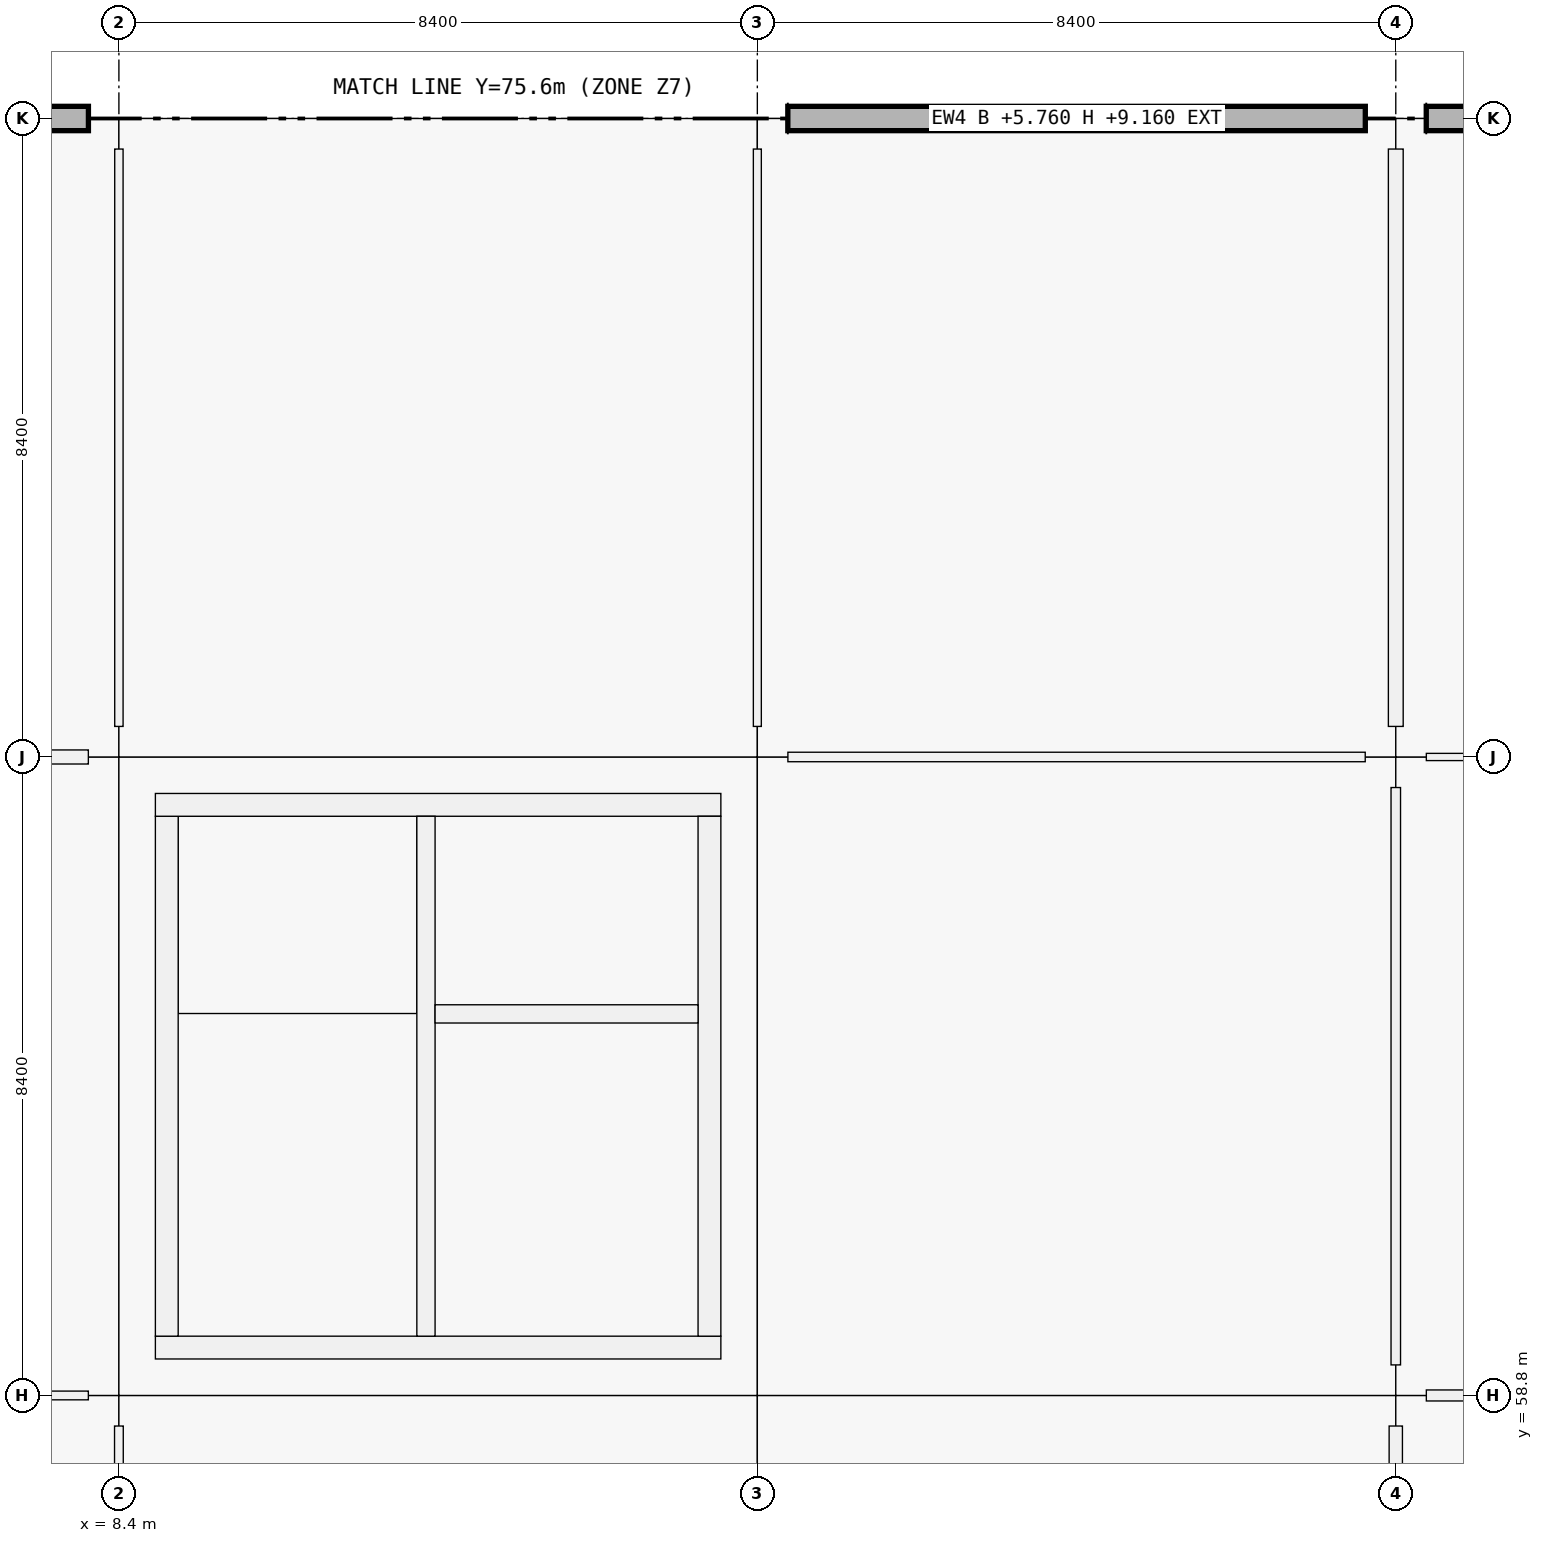
"""IFC4 building model, lengths in metres.
Left out: names, types, materials, properties, quantities, classifications, styles, units other than length and angle.
Written with IfcOpenShell. Run it as: python <this file> out.ifc"""

import sys

from ifc_helpers import new_model, si_unit, direction, frame, frame_2d, origin, origin_2d, place, context, subcontext, project, spatial, rectangle, extrude, element, fill, save


model = new_model("IFC4")
c1 = context("Model", 3, precision=1e-05, world=origin(), true_north=direction((0.0, 1.0)))
c2 = subcontext(c1, "Body", "Model", "MODEL_VIEW")
j1 = project(units=[si_unit("LENGTHUNIT", "METRE"), si_unit("PLANEANGLEUNIT", "RADIAN")], contexts=[c1])
p1 = place(None, origin())
s1 = spatial("IfcSite", under=j1, at=p1, CompositionType="ELEMENT")
p2 = place(p1, origin())
s2 = spatial("IfcBuilding", under=s1, at=p2, CompositionType="ELEMENT")
p3 = place(p2, frame((0.0, 0.0, 5.76)))
s3 = spatial("IfcBuildingStorey", under=s2, at=p3, CompositionType="ELEMENT", Elevation=5.76)
for number, where, z_axis, x_axis in (
    (1, (8.4, 58.8, 0.0), (0.0, 0.0, 1.0), (1.0, 0.0, 0.0)),
    (2, (8.4, 67.2, 0.0), (0.0, 0.0, 1.0), (1.0, 0.0, 0.0)),
    (3, (8.4, 75.6, 0.0), (0.0, 0.0, 1.0), (1.0, 0.0, 0.0)),
    (4, (16.8, 58.8, 0.0), (0.0, 0.0, 1.0), (1.0, 0.0, 0.0)),
    (5, (16.8, 67.2, 0.0), (0.0, 0.0, 1.0), (1.0, 0.0, 0.0)),
    (6, (16.8, 75.6, 0.0), (0.0, 0.0, 1.0), (1.0, 0.0, 0.0)),
    (7, (25.2, 58.8, 0.0), (0.0, 0.0, 1.0), (1.0, 0.0, 0.0)),
    (8, (25.2, 67.2, 0.0), (0.0, 0.0, 1.0), (1.0, 0.0, 0.0)),
    (9, (25.2, 75.6, 0.0), (0.0, 0.0, 1.0), (1.0, 0.0, 0.0)),
):
    element("IfcColumn", number, at=place(p3, frame(where, z_axis=z_axis, x_axis=x_axis)), inside=s3, PredefinedType="COLUMN", context=c2, shape_type="SweptSolid", body=[
        extrude(rectangle(XDim=0.8, YDim=0.8, at=origin_2d()), origin(), (0.0, 0.0, 1.0), 4.5),
    ])
p4 = place(p3, frame((0.276, 75.6, 0.0), z_axis=(0.0, 0.0, 1.0), x_axis=(1.0, 0.0, 0.0)))
e10 = element("IfcWall", 10, at=p4, inside=s3, PredefinedType="SOLIDWALL", context=c2, shape_type="SweptSolid", body=[
    extrude(rectangle(XDim=7.723, YDim=0.32, at=frame_2d((3.862, 0.0))), origin(), (0.0, 0.0, 1.0), 3.4),
])
p5 = place(p4, frame((2.861, 0.0, 0.9)))
e11 = element("IfcOpeningElement", 11, at=p5, cuts=e10, PredefinedType="OPENING", context=c2, shape_type="SweptSolid", body=[
    extrude(rectangle(XDim=2.0, YDim=2.25, at=frame_2d((1.0, 1.125))), frame((0.0, 0.16, 0.0), z_axis=(0.0, -1.0, 0.0), x_axis=(1.0, 0.0, 0.0)), (0.0, 0.0, 1.0), 0.32),
])
p6 = place(p3, frame((17.201, 75.6, 0.0), z_axis=(0.0, 0.0, 1.0), x_axis=(1.0, 0.0, 0.0)))
e12 = element("IfcWall", 12, at=p6, inside=s3, PredefinedType="SOLIDWALL", context=c2, shape_type="SweptSolid", body=[
    extrude(rectangle(XDim=7.598, YDim=0.32, at=frame_2d((3.799, 0.0))), origin(), (0.0, 0.0, 1.0), 3.4),
])
p7 = place(p6, frame((3.049, 0.0, 0.9)))
e13 = element("IfcOpeningElement", 13, at=p7, cuts=e12, PredefinedType="OPENING", context=c2, shape_type="SweptSolid", body=[
    extrude(rectangle(XDim=1.5, YDim=1.2, at=frame_2d((0.75, 0.6))), frame((0.0, 0.16, 0.0), z_axis=(0.0, -1.0, 0.0), x_axis=(1.0, 0.0, 0.0)), (0.0, 0.0, 1.0), 0.32),
])
p8 = place(p3, frame((25.601, 75.6, 0.0), z_axis=(0.0, 0.0, 1.0), x_axis=(1.0, 0.0, 0.0)))
e14 = element("IfcWall", 14, at=p8, inside=s3, PredefinedType="SOLIDWALL", context=c2, shape_type="SweptSolid", body=[
    extrude(rectangle(XDim=7.598, YDim=0.32, at=frame_2d((3.799, 0.0))), origin(), (0.0, 0.0, 1.0), 3.4),
])
p9 = place(p8, frame((2.724, 0.0, 0.9)))
e15 = element("IfcOpeningElement", 15, at=p9, cuts=e14, PredefinedType="OPENING", context=c2, shape_type="SweptSolid", body=[
    extrude(rectangle(XDim=2.15, YDim=1.95, at=frame_2d((1.075, 0.975))), frame((0.0, 0.16, 0.0), z_axis=(0.0, -1.0, 0.0), x_axis=(1.0, 0.0, 0.0)), (0.0, 0.0, 1.0), 0.32),
])
p10 = place(p3, frame((16.32, 59.43, 0.0), z_axis=(0.0, 0.0, 1.0), x_axis=(-1.0, 0.0, 0.0)))
e16 = element("IfcWall", 16, at=p10, inside=s3, PredefinedType="SHEAR", context=c2, shape_type="SweptSolid", body=[
    extrude(rectangle(XDim=7.44, YDim=0.3, at=frame_2d((3.72, 0.0))), origin(), (0.0, 0.0, 1.0), 4.5),
])
p11 = place(p10, frame((1.28, 0.0, 0.0)))
e17 = element("IfcOpeningElement", 17, at=p11, cuts=e16, PredefinedType="OPENING", context=c2, shape_type="SweptSolid", body=[
    extrude(rectangle(XDim=1.5, YDim=2.15, at=frame_2d((0.75, 1.075))), frame((0.0, 0.15, 0.0), z_axis=(0.0, -1.0, 0.0), x_axis=(1.0, 0.0, 0.0)), (0.0, 0.0, 1.0), 0.3),
])
p12 = place(p3, frame((9.03, 59.58, 0.0), z_axis=(0.0, 0.0, 1.0), x_axis=(0.0, 1.0, 0.0)))
e18 = element("IfcWall", 18, at=p12, inside=s3, PredefinedType="SHEAR", context=c2, shape_type="SweptSolid", body=[
    extrude(rectangle(XDim=6.84, YDim=0.3, at=frame_2d((3.42, 0.0))), origin(), (0.0, 0.0, 1.0), 4.5),
])
p13 = place(p3, frame((8.88, 66.57, 0.0), z_axis=(0.0, 0.0, 1.0), x_axis=(1.0, 0.0, 0.0)))
e19 = element("IfcWall", 19, at=p13, inside=s3, PredefinedType="SHEAR", context=c2, shape_type="SweptSolid", body=[
    extrude(rectangle(XDim=7.44, YDim=0.3, at=frame_2d((3.72, 0.0))), origin(), (0.0, 0.0, 1.0), 4.5),
])
p14 = place(p3, frame((16.17, 66.42, 0.0), z_axis=(0.0, 0.0, 1.0), x_axis=(0.0, -1.0, 0.0)))
e20 = element("IfcWall", 20, at=p14, inside=s3, PredefinedType="SHEAR", context=c2, shape_type="SweptSolid", body=[
    extrude(rectangle(XDim=6.84, YDim=0.3, at=frame_2d((3.42, 0.0))), origin(), (0.0, 0.0, 1.0), 4.5),
])
p15 = place(p3, frame((12.44, 59.58, 0.0), z_axis=(0.0, 0.0, 1.0), x_axis=(0.0, 1.0, 0.0)))
e21 = element("IfcWall", 21, at=p15, inside=s3, PredefinedType="SHEAR", context=c2, shape_type="SweptSolid", body=[
    extrude(rectangle(XDim=6.84, YDim=0.24, at=frame_2d((3.42, 0.0))), origin(), (0.0, 0.0, 1.0), 4.5),
])
p16 = place(p15, frame((0.12, 0.0, 0.0)))
e22 = element("IfcOpeningElement", 22, at=p16, cuts=e21, PredefinedType="OPENING", context=c2, shape_type="SweptSolid", body=[
    extrude(rectangle(XDim=1.0, YDim=2.15, at=frame_2d((0.5, 1.075))), frame((0.0, 0.12, 0.0), z_axis=(0.0, -1.0, 0.0), x_axis=(1.0, 0.0, 0.0)), (0.0, 0.0, 1.0), 0.24),
])
p17 = place(p3, frame((12.56, 63.82, 0.0), z_axis=(0.0, 0.0, 1.0), x_axis=(1.0, 0.0, 0.0)))
e23 = element("IfcWall", 23, at=p17, inside=s3, PredefinedType="SHEAR", context=c2, shape_type="SweptSolid", body=[
    extrude(rectangle(XDim=3.46, YDim=0.24, at=frame_2d((1.73, 0.0))), origin(), (0.0, 0.0, 1.0), 4.5),
])
p18 = place(p17, frame((1.18, 0.0, 0.0)))
e24 = element("IfcOpeningElement", 24, at=p18, cuts=e23, PredefinedType="OPENING", context=c2, shape_type="SweptSolid", body=[
    extrude(rectangle(XDim=1.1, YDim=2.15, at=frame_2d((0.55, 1.075))), frame((0.0, 0.12, 0.0), z_axis=(0.0, -1.0, 0.0), x_axis=(1.0, 0.0, 0.0)), (0.0, 0.0, 1.0), 0.24),
])
p19 = place(p3, frame((0.277, 58.8, 0.0), z_axis=(0.0, 0.0, 1.0), x_axis=(1.0, 0.0, 0.0)))
e25 = element("IfcWall", 25, at=p19, inside=s3, PredefinedType="PARTITIONING", context=c2, shape_type="SweptSolid", body=[
    extrude(rectangle(XDim=7.721, YDim=0.115, at=frame_2d((3.86, 0.0))), origin(), (0.0, 0.0, 1.0), 2.4),
])
p20 = place(p19, frame((3.361, 0.0, 0.0)))
e26 = element("IfcOpeningElement", 26, at=p20, cuts=e25, PredefinedType="OPENING", context=c2, shape_type="SweptSolid", body=[
    extrude(rectangle(XDim=1.0, YDim=2.2, at=frame_2d((0.5, 1.1))), frame((0.0, 0.058, 0.0), z_axis=(0.0, -1.0, 0.0), x_axis=(1.0, 0.0, 0.0)), (0.0, 0.0, 1.0), 0.115),
])
p21 = place(p3, frame((0.277, 67.2, 0.0), z_axis=(0.0, 0.0, 1.0), x_axis=(1.0, 0.0, 0.0)))
e27 = element("IfcWall", 27, at=p21, inside=s3, PredefinedType="PARTITIONING", context=c2, shape_type="SweptSolid", body=[
    extrude(rectangle(XDim=7.721, YDim=0.185, at=frame_2d((3.86, 0.0))), origin(), (0.0, 0.0, 1.0), 2.4),
])
p22 = place(p21, frame((3.37, 0.0, 0.0)))
e28 = element("IfcOpeningElement", 28, at=p22, cuts=e27, PredefinedType="OPENING", context=c2, shape_type="SweptSolid", body=[
    extrude(rectangle(XDim=0.98, YDim=2.18, at=frame_2d((0.49, 1.09))), frame((0.0, 0.093, 0.0), z_axis=(0.0, -1.0, 0.0), x_axis=(1.0, 0.0, 0.0)), (0.0, 0.0, 1.0), 0.185),
])
p23 = place(p3, frame((17.202, 67.2, 0.0), z_axis=(0.0, 0.0, 1.0), x_axis=(1.0, 0.0, 0.0)))
e29 = element("IfcWall", 29, at=p23, inside=s3, PredefinedType="PARTITIONING", context=c2, shape_type="SweptSolid", body=[
    extrude(rectangle(XDim=7.596, YDim=0.125, at=frame_2d((3.798, 0.0))), origin(), (0.0, 0.0, 1.0), 2.4),
])
p24 = place(p23, frame((3.273, 0.0, 0.0)))
e30 = element("IfcOpeningElement", 30, at=p24, cuts=e29, PredefinedType="OPENING", context=c2, shape_type="SweptSolid", body=[
    extrude(rectangle(XDim=1.05, YDim=2.12, at=frame_2d((0.525, 1.06))), frame((0.0, 0.062, 0.0), z_axis=(0.0, -1.0, 0.0), x_axis=(1.0, 0.0, 0.0)), (0.0, 0.0, 1.0), 0.125),
])
p25 = place(p3, frame((25.602, 58.8, 0.0), z_axis=(0.0, 0.0, 1.0), x_axis=(1.0, 0.0, 0.0)))
e31 = element("IfcWall", 31, at=p25, inside=s3, PredefinedType="PARTITIONING", context=c2, shape_type="SweptSolid", body=[
    extrude(rectangle(XDim=7.596, YDim=0.145, at=frame_2d((3.798, 0.0))), origin(), (0.0, 0.0, 1.0), 2.4),
])
p26 = place(p25, frame((3.268, 0.0, 0.0)))
e32 = element("IfcOpeningElement", 32, at=p26, cuts=e31, PredefinedType="OPENING", context=c2, shape_type="SweptSolid", body=[
    extrude(rectangle(XDim=1.06, YDim=2.22, at=frame_2d((0.53, 1.11))), frame((0.0, 0.073, 0.0), z_axis=(0.0, -1.0, 0.0), x_axis=(1.0, 0.0, 0.0)), (0.0, 0.0, 1.0), 0.145),
])
p27 = place(p3, frame((25.602, 67.2, 0.0), z_axis=(0.0, 0.0, 1.0), x_axis=(1.0, 0.0, 0.0)))
e33 = element("IfcWall", 33, at=p27, inside=s3, PredefinedType="PARTITIONING", context=c2, shape_type="SweptSolid", body=[
    extrude(rectangle(XDim=7.596, YDim=0.095, at=frame_2d((3.798, 0.0))), origin(), (0.0, 0.0, 1.0), 2.4),
])
p28 = place(p27, frame((3.258, 0.0, 0.0)))
e34 = element("IfcOpeningElement", 34, at=p28, cuts=e33, PredefinedType="OPENING", context=c2, shape_type="SweptSolid", body=[
    extrude(rectangle(XDim=1.08, YDim=2.22, at=frame_2d((0.54, 1.11))), frame((0.0, 0.047, 0.0), z_axis=(0.0, -1.0, 0.0), x_axis=(1.0, 0.0, 0.0)), (0.0, 0.0, 1.0), 0.095),
])
p29 = place(p3, frame((8.4, 50.802, 0.0), z_axis=(0.0, 0.0, 1.0), x_axis=(0.0, 1.0, 0.0)))
e35 = element("IfcWall", 35, at=p29, inside=s3, PredefinedType="PARTITIONING", context=c2, shape_type="SweptSolid", body=[
    extrude(rectangle(XDim=7.596, YDim=0.115, at=frame_2d((3.798, 0.0))), origin(), (0.0, 0.0, 1.0), 2.4),
])
p30 = place(p29, frame((3.333, 0.0, 0.0)))
e36 = element("IfcOpeningElement", 36, at=p30, cuts=e35, PredefinedType="OPENING", context=c2, shape_type="SweptSolid", body=[
    extrude(rectangle(XDim=0.93, YDim=2.12, at=frame_2d((0.465, 1.06))), frame((0.0, 0.058, 0.0), z_axis=(0.0, -1.0, 0.0), x_axis=(1.0, 0.0, 0.0)), (0.0, 0.0, 1.0), 0.115),
])
p31 = place(p3, frame((8.4, 67.602, 0.0), z_axis=(0.0, 0.0, 1.0), x_axis=(0.0, 1.0, 0.0)))
e37 = element("IfcWall", 37, at=p31, inside=s3, PredefinedType="MOVABLE", context=c2, shape_type="SweptSolid", body=[
    extrude(rectangle(XDim=7.596, YDim=0.11, at=frame_2d((3.798, 0.0))), origin(), (0.0, 0.0, 1.0), 2.4),
])
p32 = place(p31, frame((3.318, 0.0, 0.0)))
e38 = element("IfcOpeningElement", 38, at=p32, cuts=e37, PredefinedType="OPENING", context=c2, shape_type="SweptSolid", body=[
    extrude(rectangle(XDim=0.96, YDim=2.18, at=frame_2d((0.48, 1.09))), frame((0.0, 0.055, 0.0), z_axis=(0.0, -1.0, 0.0), x_axis=(1.0, 0.0, 0.0)), (0.0, 0.0, 1.0), 0.11),
])
p33 = place(p3, frame((16.8, 67.602, 0.0), z_axis=(0.0, 0.0, 1.0), x_axis=(0.0, 1.0, 0.0)))
e39 = element("IfcWall", 39, at=p33, inside=s3, PredefinedType="PARTITIONING", context=c2, shape_type="SweptSolid", body=[
    extrude(rectangle(XDim=7.596, YDim=0.105, at=frame_2d((3.798, 0.0))), origin(), (0.0, 0.0, 1.0), 2.4),
])
p34 = place(p33, frame((3.313, 0.0, 0.0)))
e40 = element("IfcOpeningElement", 40, at=p34, cuts=e39, PredefinedType="OPENING", context=c2, shape_type="SweptSolid", body=[
    extrude(rectangle(XDim=0.97, YDim=2.12, at=frame_2d((0.485, 1.06))), frame((0.0, 0.052, 0.0), z_axis=(0.0, -1.0, 0.0), x_axis=(1.0, 0.0, 0.0)), (0.0, 0.0, 1.0), 0.105),
])
p35 = place(p3, frame((25.2, 50.802, 0.0), z_axis=(0.0, 0.0, 1.0), x_axis=(0.0, 1.0, 0.0)))
e41 = element("IfcWall", 41, at=p35, inside=s3, PredefinedType="PARTITIONING", context=c2, shape_type="SweptSolid", body=[
    extrude(rectangle(XDim=7.596, YDim=0.175, at=frame_2d((3.798, 0.0))), origin(), (0.0, 0.0, 1.0), 2.4),
])
p36 = place(p35, frame((3.288, 0.0, 0.0)))
e42 = element("IfcOpeningElement", 42, at=p36, cuts=e41, PredefinedType="OPENING", context=c2, shape_type="SweptSolid", body=[
    extrude(rectangle(XDim=1.02, YDim=2.2, at=frame_2d((0.51, 1.1))), frame((0.0, 0.087, 0.0), z_axis=(0.0, -1.0, 0.0), x_axis=(1.0, 0.0, 0.0)), (0.0, 0.0, 1.0), 0.175),
])
p37 = place(p3, frame((25.2, 59.202, 0.0), z_axis=(0.0, 0.0, 1.0), x_axis=(0.0, 1.0, 0.0)))
e43 = element("IfcWall", 43, at=p37, inside=s3, PredefinedType="PARTITIONING", context=c2, shape_type="SweptSolid", body=[
    extrude(rectangle(XDim=7.596, YDim=0.125, at=frame_2d((3.798, 0.0))), origin(), (0.0, 0.0, 1.0), 2.4),
])
p38 = place(p37, frame((3.298, 0.0, 0.0)))
e44 = element("IfcOpeningElement", 44, at=p38, cuts=e43, PredefinedType="OPENING", context=c2, shape_type="SweptSolid", body=[
    extrude(rectangle(XDim=1.0, YDim=2.2, at=frame_2d((0.5, 1.1))), frame((0.0, 0.062, 0.0), z_axis=(0.0, -1.0, 0.0), x_axis=(1.0, 0.0, 0.0)), (0.0, 0.0, 1.0), 0.125),
])
p39 = place(p3, frame((25.2, 67.602, 0.0), z_axis=(0.0, 0.0, 1.0), x_axis=(0.0, 1.0, 0.0)))
e45 = element("IfcWall", 45, at=p39, inside=s3, PredefinedType="PARTITIONING", context=c2, shape_type="SweptSolid", body=[
    extrude(rectangle(XDim=7.596, YDim=0.195, at=frame_2d((3.798, 0.0))), origin(), (0.0, 0.0, 1.0), 2.4),
])
p40 = place(p39, frame((3.288, 0.0, 0.0)))
e46 = element("IfcOpeningElement", 46, at=p40, cuts=e45, PredefinedType="OPENING", context=c2, shape_type="SweptSolid", body=[
    extrude(rectangle(XDim=1.02, YDim=2.2, at=frame_2d((0.51, 1.1))), frame((0.0, 0.098, 0.0), z_axis=(0.0, -1.0, 0.0), x_axis=(1.0, 0.0, 0.0)), (0.0, 0.0, 1.0), 0.195),
])
p41 = place(p7, origin())
e47 = element("IfcWindow", 47, at=p41, inside=s3, PartitioningType="SINGLE_PANEL", PredefinedType="WINDOW", context=c2, shape_type="SweptSolid", body=[
    extrude(rectangle(XDim=1.5, YDim=1.2, at=frame_2d((0.75, 0.6))), frame((0.0, 0.03, 0.0), z_axis=(0.0, -1.0, 0.0), x_axis=(1.0, 0.0, 0.0)), (0.0, 0.0, 1.0), 0.06),
])
fill(e13, e47)
p42 = place(p16, origin())
e48 = element("IfcDoor", 48, at=p42, inside=s3, OperationType="SINGLE_SWING_LEFT", PredefinedType="DOOR", context=c2, shape_type="SweptSolid", body=[
    extrude(rectangle(XDim=1.0, YDim=2.15, at=frame_2d((0.5, 1.075))), frame((0.0, 0.025, 0.0), z_axis=(0.0, -1.0, 0.0), x_axis=(1.0, 0.0, 0.0)), (0.0, 0.0, 1.0), 0.05),
])
fill(e22, e48)
p43 = place(p11, origin())
e49 = element("IfcDoor", 49, at=p43, inside=s3, OperationType="DOUBLE_DOOR_SINGLE_SWING", PredefinedType="DOOR", context=c2, shape_type="SweptSolid", body=[
    extrude(rectangle(XDim=1.5, YDim=2.15, at=frame_2d((0.75, 1.075))), frame((0.0, 0.025, 0.0), z_axis=(0.0, -1.0, 0.0), x_axis=(1.0, 0.0, 0.0)), (0.0, 0.0, 1.0), 0.05),
])
fill(e17, e49)
p44 = place(p18, origin())
e50 = element("IfcDoor", 50, at=p44, inside=s3, OperationType="DOUBLE_DOOR_SLIDING", PredefinedType="DOOR", context=c2, shape_type="SweptSolid", body=[
    extrude(rectangle(XDim=1.1, YDim=2.15, at=frame_2d((0.55, 1.075))), frame((0.0, 0.025, 0.0), z_axis=(0.0, -1.0, 0.0), x_axis=(1.0, 0.0, 0.0)), (0.0, 0.0, 1.0), 0.05),
])
fill(e24, e50)
p45 = place(p24, origin())
e51 = element("IfcDoor", 51, at=p45, inside=s3, OperationType="SINGLE_SWING_LEFT", PredefinedType="DOOR", context=c2, shape_type="SweptSolid", body=[
    extrude(rectangle(XDim=1.05, YDim=2.12, at=frame_2d((0.525, 1.06))), frame((0.0, 0.025, 0.0), z_axis=(0.0, -1.0, 0.0), x_axis=(1.0, 0.0, 0.0)), (0.0, 0.0, 1.0), 0.05),
])
fill(e30, e51)
p46 = place(p38, origin())
e52 = element("IfcDoor", 52, at=p46, inside=s3, OperationType="SINGLE_SWING_RIGHT", PredefinedType="DOOR", context=c2, shape_type="SweptSolid", body=[
    extrude(rectangle(XDim=1.0, YDim=2.2, at=frame_2d((0.5, 1.1))), frame((0.0, 0.025, 0.0), z_axis=(0.0, -1.0, 0.0), x_axis=(1.0, 0.0, 0.0)), (0.0, 0.0, 1.0), 0.05),
])
fill(e44, e52)
p47 = place(p32, origin())
e53 = element("IfcDoor", 53, at=p47, inside=s3, OperationType="SINGLE_SWING_LEFT", PredefinedType="DOOR", context=c2, shape_type="SweptSolid", body=[
    extrude(rectangle(XDim=0.96, YDim=2.18, at=frame_2d((0.48, 1.09))), frame((0.0, 0.025, 0.0), z_axis=(0.0, -1.0, 0.0), x_axis=(1.0, 0.0, 0.0)), (0.0, 0.0, 1.0), 0.05),
])
fill(e38, e53)
p48 = place(p34, origin())
e54 = element("IfcDoor", 54, at=p48, inside=s3, OperationType="SINGLE_SWING_RIGHT", PredefinedType="DOOR", context=c2, shape_type="SweptSolid", body=[
    extrude(rectangle(XDim=0.97, YDim=2.12, at=frame_2d((0.485, 1.06))), frame((0.0, 0.025, 0.0), z_axis=(0.0, -1.0, 0.0), x_axis=(1.0, 0.0, 0.0)), (0.0, 0.0, 1.0), 0.05),
])
fill(e40, e54)
p49 = place(p40, origin())
e55 = element("IfcDoor", 55, at=p49, inside=s3, OperationType="SINGLE_SWING_LEFT", PredefinedType="DOOR", context=c2, shape_type="SweptSolid", body=[
    extrude(rectangle(XDim=1.02, YDim=2.2, at=frame_2d((0.51, 1.1))), frame((0.0, 0.025, 0.0), z_axis=(0.0, -1.0, 0.0), x_axis=(1.0, 0.0, 0.0)), (0.0, 0.0, 1.0), 0.05),
])
fill(e46, e55)
save(model, sys.argv[1])
